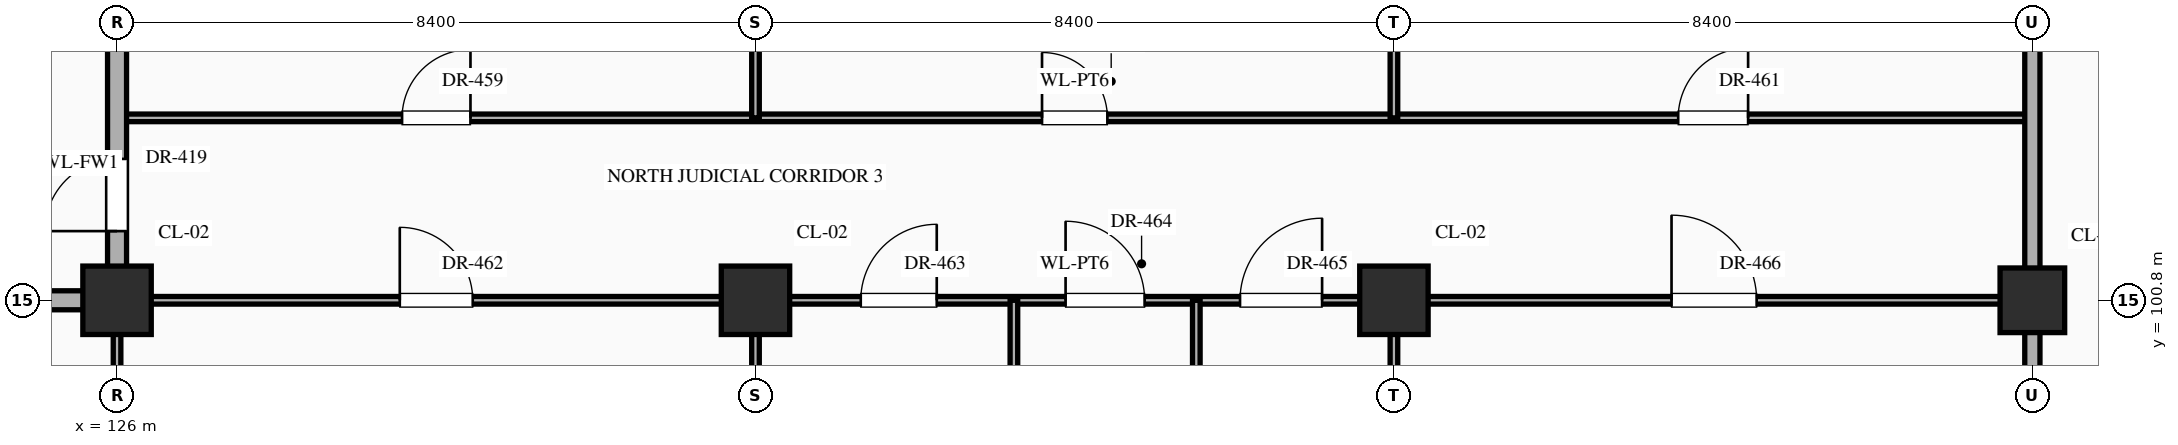
"""IFC4 building model, lengths in metres.
Left out: names, types, materials, properties, quantities, classifications, styles, units other than length and angle.
Written with IfcOpenShell. Run it as: python <this file> out.ifc"""

import sys

from ifc_helpers import new_model, si_unit, direction, frame, frame_2d, origin, origin_2d, place, context, subcontext, project, spatial, rectangle, extrude, element, fill, save


model = new_model("IFC4")
c1 = context("Model", 3, precision=1e-05, world=origin(), true_north=direction((0.0, 1.0)))
c2 = subcontext(c1, "Body", "Model", "MODEL_VIEW")
j1 = project(units=[si_unit("LENGTHUNIT", "METRE"), si_unit("PLANEANGLEUNIT", "RADIAN")], contexts=[c1])
p1 = place(None, origin())
s1 = spatial("IfcSite", under=j1, at=p1, CompositionType="ELEMENT")
p2 = place(p1, origin())
s2 = spatial("IfcBuilding", under=s1, at=p2, CompositionType="ELEMENT")
p3 = place(p2, frame((0.0, 0.0, -5.4)))
s3 = spatial("IfcBuildingStorey", under=s2, at=p3, CompositionType="ELEMENT", Elevation=-5.4)
for number, where, z_axis, x_axis in (
    (1, (126.0, 100.8, 0.0), (0.0, 0.0, 1.0), (1.0, 0.0, 0.0)),
    (2, (134.4, 100.8, 0.0), (0.0, 0.0, 1.0), (1.0, 0.0, 0.0)),
    (3, (142.8, 100.8, 0.0), (0.0, 0.0, 1.0), (1.0, 0.0, 0.0)),
):
    element("IfcColumn", number, at=place(p3, frame(where, z_axis=z_axis, x_axis=x_axis)), inside=s3, PredefinedType="COLUMN", context=c2, shape_type="SweptSolid", body=[
        extrude(rectangle(XDim=0.9, YDim=0.9, at=origin_2d()), origin(), (0.0, 0.0, 1.0), 5.4),
    ])
p4 = place(p3, frame((151.2, 100.8, 0.0), z_axis=(0.0, 0.0, 1.0), x_axis=(1.0, 0.0, 0.0)))
e4 = element("IfcColumn", 4, at=p4, inside=s3, PredefinedType="COLUMN", context=c2, shape_type="SweptSolid", body=[
    extrude(rectangle(XDim=0.85, YDim=0.85, at=origin_2d()), origin(), (0.0, 0.0, 1.0), 5.4),
])
p5 = place(p3, frame((121.8, 100.8, 0.0), z_axis=(0.0, 0.0, 1.0), x_axis=(1.0, 0.0, 0.0)))
e5 = element("IfcWall", 5, at=p5, inside=s3, PredefinedType="STANDARD", context=c2, shape_type="SweptSolid", body=[
    extrude(rectangle(XDim=4.2, YDim=0.25, at=frame_2d((2.1, 0.0))), origin(), (0.0, 0.0, 1.0), 4.25),
])
p6 = place(p3, frame((126.0, 100.8, 0.0), z_axis=(0.0, 0.0, 1.0), x_axis=(1.0, 0.0, 0.0)))
e6 = element("IfcWall", 6, at=p6, inside=s3, PredefinedType="STANDARD", context=c2, shape_type="SweptSolid", body=[
    extrude(rectangle(XDim=25.2, YDim=0.1, at=frame_2d((12.6, 0.0))), origin(), (0.0, 0.0, 1.0), 4.25),
])
p7 = place(p6, frame((3.72, 0.0, 0.0)))
e7 = element("IfcOpeningElement", 7, at=p7, cuts=e6, PredefinedType="OPENING", context=c2, shape_type="SweptSolid", body=[
    extrude(rectangle(XDim=0.96, YDim=2.2, at=frame_2d((0.48, 1.1))), frame((0.0, 0.062, 0.0), z_axis=(0.0, -1.0, 0.0), x_axis=(1.0, 0.0, 0.0)), (0.0, 0.0, 1.0), 0.124),
])
p8 = place(p6, frame((9.785, 0.0, 0.0)))
e8 = element("IfcOpeningElement", 8, at=p8, cuts=e6, PredefinedType="OPENING", context=c2, shape_type="SweptSolid", body=[
    extrude(rectangle(XDim=1.0, YDim=2.25, at=frame_2d((0.5, 1.125))), frame((0.0, 0.062, 0.0), z_axis=(0.0, -1.0, 0.0), x_axis=(1.0, 0.0, 0.0)), (0.0, 0.0, 1.0), 0.124),
])
p9 = place(p6, frame((12.48, 0.0, 0.0)))
e9 = element("IfcOpeningElement", 9, at=p9, cuts=e6, PredefinedType="OPENING", context=c2, shape_type="SweptSolid", body=[
    extrude(rectangle(XDim=1.04, YDim=2.2, at=frame_2d((0.52, 1.1))), frame((0.0, 0.062, 0.0), z_axis=(0.0, -1.0, 0.0), x_axis=(1.0, 0.0, 0.0)), (0.0, 0.0, 1.0), 0.124),
])
p10 = place(p6, frame((14.775, 0.0, 0.0)))
e10 = element("IfcOpeningElement", 10, at=p10, cuts=e6, PredefinedType="OPENING", context=c2, shape_type="SweptSolid", body=[
    extrude(rectangle(XDim=1.08, YDim=2.25, at=frame_2d((0.54, 1.125))), frame((0.0, 0.062, 0.0), z_axis=(0.0, -1.0, 0.0), x_axis=(1.0, 0.0, 0.0)), (0.0, 0.0, 1.0), 0.124),
])
p11 = place(p6, frame((20.452, 0.0, 0.0)))
e11 = element("IfcOpeningElement", 11, at=p11, cuts=e6, PredefinedType="OPENING", context=c2, shape_type="SweptSolid", body=[
    extrude(rectangle(XDim=1.12, YDim=2.25, at=frame_2d((0.56, 1.125))), frame((0.0, 0.062, 0.0), z_axis=(0.0, -1.0, 0.0), x_axis=(1.0, 0.0, 0.0)), (0.0, 0.0, 1.0), 0.124),
])
p12 = place(p3, frame((126.0, 103.2, 0.0), z_axis=(0.0, 0.0, 1.0), x_axis=(1.0, 0.0, 0.0)))
e12 = element("IfcWall", 12, at=p12, inside=s3, PredefinedType="STANDARD", context=c2, shape_type="SweptSolid", body=[
    extrude(rectangle(XDim=25.2, YDim=0.1, at=frame_2d((12.6, 0.0))), origin(), (0.0, 0.0, 1.0), 5.1),
])
p13 = place(p12, frame((3.75, 0.0, 0.0)))
e13 = element("IfcOpeningElement", 13, at=p13, cuts=e12, PredefinedType="OPENING", context=c2, shape_type="SweptSolid", body=[
    extrude(rectangle(XDim=0.9, YDim=2.15, at=frame_2d((0.45, 1.075))), frame((0.0, 0.062, 0.0), z_axis=(0.0, -1.0, 0.0), x_axis=(1.0, 0.0, 0.0)), (0.0, 0.0, 1.0), 0.124),
])
p14 = place(p12, frame((12.17, 0.0, 0.0)))
e14 = element("IfcOpeningElement", 14, at=p14, cuts=e12, PredefinedType="OPENING", context=c2, shape_type="SweptSolid", body=[
    extrude(rectangle(XDim=0.86, YDim=2.1, at=frame_2d((0.43, 1.05))), frame((0.0, 0.062, 0.0), z_axis=(0.0, -1.0, 0.0), x_axis=(1.0, 0.0, 0.0)), (0.0, 0.0, 1.0), 0.124),
])
p15 = place(p12, frame((20.54, 0.0, 0.0)))
e15 = element("IfcOpeningElement", 15, at=p15, cuts=e12, PredefinedType="OPENING", context=c2, shape_type="SweptSolid", body=[
    extrude(rectangle(XDim=0.92, YDim=2.15, at=frame_2d((0.46, 1.075))), frame((0.0, 0.062, 0.0), z_axis=(0.0, -1.0, 0.0), x_axis=(1.0, 0.0, 0.0)), (0.0, 0.0, 1.0), 0.124),
])
p16 = place(p3, frame((126.0, 96.0, 0.0), z_axis=(0.0, 0.0, 1.0), x_axis=(0.0, 1.0, 0.0)))
e16 = element("IfcWall", 16, at=p16, inside=s3, PredefinedType="STANDARD", context=c2, shape_type="SweptSolid", body=[
    extrude(rectangle(XDim=4.8, YDim=0.1, at=frame_2d((2.4, 0.0))), origin(), (0.0, 0.0, 1.0), 4.35),
])
p17 = place(p3, frame((126.0, 100.8, 0.0), z_axis=(0.0, 0.0, 1.0), x_axis=(0.0, 1.0, 0.0)))
e17 = element("IfcWall", 17, at=p17, inside=s3, PredefinedType="STANDARD", context=c2, shape_type="SweptSolid", body=[
    extrude(rectangle(XDim=3.6, YDim=0.25, at=frame_2d((1.8, 0.0))), origin(), (0.0, 0.0, 1.0), 4.35),
])
p18 = place(p17, frame((0.91, 0.0, 0.0)))
e18 = element("IfcOpeningElement", 18, at=p18, cuts=e17, PredefinedType="OPENING", context=c2, shape_type="SweptSolid", body=[
    extrude(rectangle(XDim=0.95, YDim=2.15, at=frame_2d((0.475, 1.075))), frame((0.0, 0.137, 0.0), z_axis=(0.0, -1.0, 0.0), x_axis=(1.0, 0.0, 0.0)), (0.0, 0.0, 1.0), 0.274),
])
for number, where, z_axis, x_axis in (
    (19, (134.4, 96.0, 0.0), (0.0, 0.0, 1.0), (0.0, 1.0, 0.0)),
    (20, (134.4, 103.2, 0.0), (0.0, 0.0, 1.0), (0.0, 1.0, 0.0)),
):
    element("IfcWall", number, at=place(p3, frame(where, z_axis=z_axis, x_axis=x_axis)), inside=s3, PredefinedType="STANDARD", context=c2, shape_type="SweptSolid", body=[
        extrude(rectangle(XDim=4.8, YDim=0.1, at=frame_2d((2.4, 0.0))), origin(), (0.0, 0.0, 1.0), 4.35),
    ])
p19 = place(p3, frame((137.8, 96.0, 0.0), z_axis=(0.0, 0.0, 1.0), x_axis=(0.0, 1.0, 0.0)))
e21 = element("IfcWall", 21, at=p19, inside=s3, PredefinedType="STANDARD", context=c2, shape_type="SweptSolid", body=[
    extrude(rectangle(XDim=4.8, YDim=0.1, at=frame_2d((2.4, 0.0))), origin(), (0.0, 0.0, 1.0), 5.1),
])
p20 = place(p19, frame((1.9, 0.0, 0.0)))
e22 = element("IfcOpeningElement", 22, at=p20, cuts=e21, PredefinedType="OPENING", context=c2, shape_type="SweptSolid", body=[
    extrude(rectangle(XDim=1.0, YDim=2.25, at=frame_2d((0.5, 1.125))), frame((0.0, 0.062, 0.0), z_axis=(0.0, -1.0, 0.0), x_axis=(1.0, 0.0, 0.0)), (0.0, 0.0, 1.0), 0.124),
])
p21 = place(p3, frame((140.2, 96.0, 0.0), z_axis=(0.0, 0.0, 1.0), x_axis=(0.0, 1.0, 0.0)))
e23 = element("IfcWall", 23, at=p21, inside=s3, PredefinedType="STANDARD", context=c2, shape_type="SweptSolid", body=[
    extrude(rectangle(XDim=4.8, YDim=0.1, at=frame_2d((2.4, 0.0))), origin(), (0.0, 0.0, 1.0), 5.1),
])
p22 = place(p21, frame((1.88, 0.0, 0.0)))
e24 = element("IfcOpeningElement", 24, at=p22, cuts=e23, PredefinedType="OPENING", context=c2, shape_type="SweptSolid", body=[
    extrude(rectangle(XDim=1.04, YDim=2.2, at=frame_2d((0.52, 1.1))), frame((0.0, 0.062, 0.0), z_axis=(0.0, -1.0, 0.0), x_axis=(1.0, 0.0, 0.0)), (0.0, 0.0, 1.0), 0.124),
])
for number, where, z_axis, x_axis in (
    (25, (142.8, 96.0, 0.0), (0.0, 0.0, 1.0), (0.0, 1.0, 0.0)),
    (26, (142.8, 103.2, 0.0), (0.0, 0.0, 1.0), (0.0, 1.0, 0.0)),
):
    element("IfcWall", number, at=place(p3, frame(where, z_axis=z_axis, x_axis=x_axis)), inside=s3, PredefinedType="STANDARD", context=c2, shape_type="SweptSolid", body=[
        extrude(rectangle(XDim=4.8, YDim=0.1, at=frame_2d((2.4, 0.0))), origin(), (0.0, 0.0, 1.0), 4.35),
    ])
p23 = place(p3, frame((151.2, 91.2, 0.0), z_axis=(0.0, 0.0, 1.0), x_axis=(0.0, 1.0, 0.0)))
e27 = element("IfcWall", 27, at=p23, inside=s3, PredefinedType="STANDARD", context=c2, shape_type="SweptSolid", body=[
    extrude(rectangle(XDim=16.8, YDim=0.2, at=frame_2d((8.4, 0.0))), origin(), (0.0, 0.0, 1.0), 4.35),
])
p24 = place(p18, origin())
e28 = element("IfcDoor", 28, at=p24, inside=s3, OperationType="SINGLE_SWING_LEFT", PredefinedType="DOOR", context=c2, shape_type="SweptSolid", body=[
    extrude(rectangle(XDim=0.95, YDim=2.15, at=frame_2d((0.475, 1.075))), frame((0.0, 0.025, 0.0), z_axis=(0.0, -1.0, 0.0), x_axis=(1.0, 0.0, 0.0)), (0.0, 0.0, 1.0), 0.05),
])
fill(e18, e28)
p25 = place(p13, origin())
e29 = element("IfcDoor", 29, at=p25, inside=s3, OperationType="SINGLE_SWING_RIGHT", PredefinedType="DOOR", context=c2, shape_type="SweptSolid", body=[
    extrude(rectangle(XDim=0.9, YDim=2.15, at=frame_2d((0.45, 1.075))), frame((0.0, 0.025, 0.0), z_axis=(0.0, -1.0, 0.0), x_axis=(1.0, 0.0, 0.0)), (0.0, 0.0, 1.0), 0.05),
])
fill(e13, e29)
p26 = place(p14, origin())
e30 = element("IfcDoor", 30, at=p26, inside=s3, OperationType="SINGLE_SWING_LEFT", PredefinedType="DOOR", context=c2, shape_type="SweptSolid", body=[
    extrude(rectangle(XDim=0.86, YDim=2.1, at=frame_2d((0.43, 1.05))), frame((0.0, 0.025, 0.0), z_axis=(0.0, -1.0, 0.0), x_axis=(1.0, 0.0, 0.0)), (0.0, 0.0, 1.0), 0.05),
])
fill(e14, e30)
p27 = place(p15, origin())
e31 = element("IfcDoor", 31, at=p27, inside=s3, OperationType="SINGLE_SWING_RIGHT", PredefinedType="DOOR", context=c2, shape_type="SweptSolid", body=[
    extrude(rectangle(XDim=0.92, YDim=2.15, at=frame_2d((0.46, 1.075))), frame((0.0, 0.025, 0.0), z_axis=(0.0, -1.0, 0.0), x_axis=(1.0, 0.0, 0.0)), (0.0, 0.0, 1.0), 0.05),
])
fill(e15, e31)
p28 = place(p7, origin())
e32 = element("IfcDoor", 32, at=p28, inside=s3, OperationType="SINGLE_SWING_LEFT", PredefinedType="DOOR", context=c2, shape_type="SweptSolid", body=[
    extrude(rectangle(XDim=0.96, YDim=2.2, at=frame_2d((0.48, 1.1))), frame((0.0, 0.025, 0.0), z_axis=(0.0, -1.0, 0.0), x_axis=(1.0, 0.0, 0.0)), (0.0, 0.0, 1.0), 0.05),
])
fill(e7, e32)
p29 = place(p8, origin())
e33 = element("IfcDoor", 33, at=p29, inside=s3, OperationType="SINGLE_SWING_RIGHT", PredefinedType="DOOR", context=c2, shape_type="SweptSolid", body=[
    extrude(rectangle(XDim=1.0, YDim=2.25, at=frame_2d((0.5, 1.125))), frame((0.0, 0.025, 0.0), z_axis=(0.0, -1.0, 0.0), x_axis=(1.0, 0.0, 0.0)), (0.0, 0.0, 1.0), 0.05),
])
fill(e8, e33)
p30 = place(p9, origin())
e34 = element("IfcDoor", 34, at=p30, inside=s3, OperationType="SINGLE_SWING_LEFT", PredefinedType="DOOR", context=c2, shape_type="SweptSolid", body=[
    extrude(rectangle(XDim=1.04, YDim=2.2, at=frame_2d((0.52, 1.1))), frame((0.0, 0.025, 0.0), z_axis=(0.0, -1.0, 0.0), x_axis=(1.0, 0.0, 0.0)), (0.0, 0.0, 1.0), 0.05),
])
fill(e9, e34)
p31 = place(p10, origin())
e35 = element("IfcDoor", 35, at=p31, inside=s3, OperationType="SINGLE_SWING_RIGHT", PredefinedType="DOOR", context=c2, shape_type="SweptSolid", body=[
    extrude(rectangle(XDim=1.08, YDim=2.25, at=frame_2d((0.54, 1.125))), frame((0.0, 0.025, 0.0), z_axis=(0.0, -1.0, 0.0), x_axis=(1.0, 0.0, 0.0)), (0.0, 0.0, 1.0), 0.05),
])
fill(e10, e35)
p32 = place(p11, origin())
e36 = element("IfcDoor", 36, at=p32, inside=s3, OperationType="SINGLE_SWING_LEFT", PredefinedType="DOOR", context=c2, shape_type="SweptSolid", body=[
    extrude(rectangle(XDim=1.12, YDim=2.25, at=frame_2d((0.56, 1.125))), frame((0.0, 0.025, 0.0), z_axis=(0.0, -1.0, 0.0), x_axis=(1.0, 0.0, 0.0)), (0.0, 0.0, 1.0), 0.05),
])
fill(e11, e36)
save(model, sys.argv[1])
